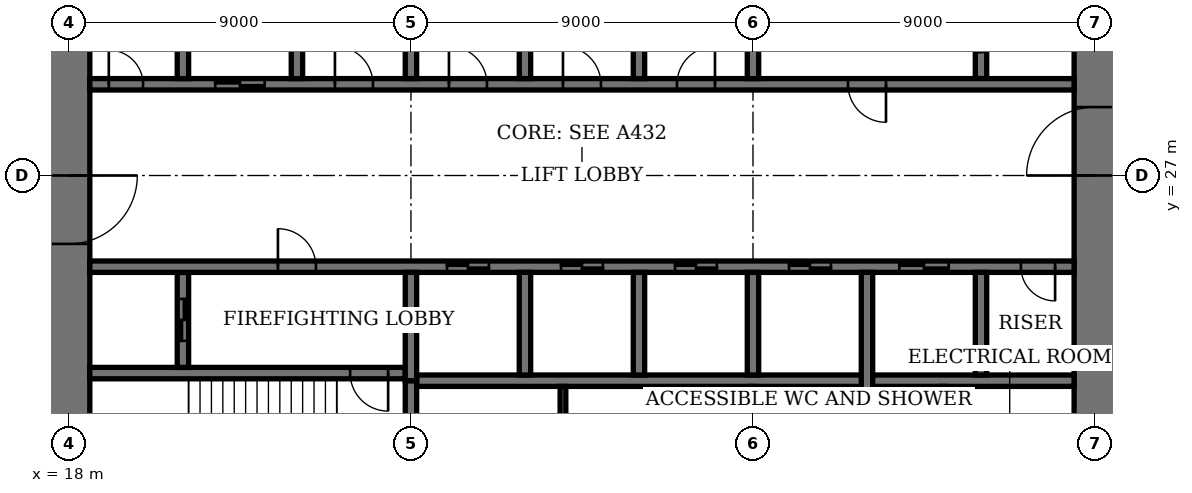
"""IFC4 building model, lengths in metres.
Left out: names, types, materials, properties, quantities, classifications, styles, units other than length and angle.
Written with IfcOpenShell. Run it as: python <this file> out.ifc"""

import sys

from ifc_helpers import new_model, si_unit, direction, frame, frame_2d, origin, place, context, subcontext, project, spatial, rectangle, extrude, element, fill, save


model = new_model("IFC4")
c1 = context("Model", 3, precision=1e-05, world=origin(), true_north=direction((0.0, 1.0)))
c2 = subcontext(c1, "Body", "Model", "MODEL_VIEW")
j1 = project(units=[si_unit("LENGTHUNIT", "METRE"), si_unit("PLANEANGLEUNIT", "RADIAN")], contexts=[c1])
p1 = place(None, origin())
s1 = spatial("IfcSite", under=j1, at=p1, CompositionType="ELEMENT")
p2 = place(p1, origin())
s2 = spatial("IfcBuilding", under=s1, at=p2, CompositionType="ELEMENT")
p3 = place(p2, frame((0.0, 0.0, 243.4)))
s3 = spatial("IfcBuildingStorey", under=s2, at=p3, CompositionType="ELEMENT", Elevation=243.4)
p4 = place(p3, frame((18.0, 35.45, 0.0), z_axis=(0.0, 0.0, 1.0), x_axis=(0.0, -1.0, 0.0)))
e1 = element("IfcWall", 1, at=p4, inside=s3, PredefinedType="SHEAR", context=c2, shape_type="SweptSolid", body=[
    extrude(rectangle(XDim=16.9, YDim=1.1, at=frame_2d((8.45, 0.0))), origin(), (0.0, 0.0, 1.0), 4.0),
])
p5 = place(p4, frame((8.45, 0.0, 0.0)))
e2 = element("IfcOpeningElement", 2, at=p5, cuts=e1, PredefinedType="OPENING", context=c2, shape_type="SweptSolid", body=[
    extrude(rectangle(XDim=1.8, YDim=2.4, at=frame_2d((0.9, 1.2))), frame((0.0, 0.56, 0.0), z_axis=(0.0, -1.0, 0.0), x_axis=(1.0, 0.0, 0.0)), (0.0, 0.0, 1.0), 1.12),
])
p6 = place(p3, frame((45.0, 18.55, 0.0), z_axis=(0.0, 0.0, 1.0), x_axis=(0.0, 1.0, 0.0)))
e3 = element("IfcWall", 3, at=p6, inside=s3, PredefinedType="SHEAR", context=c2, shape_type="SweptSolid", body=[
    extrude(rectangle(XDim=16.9, YDim=1.1, at=frame_2d((8.45, 0.0))), origin(), (0.0, 0.0, 1.0), 4.0),
])
p7 = place(p6, frame((8.45, 0.0, 0.0)))
e4 = element("IfcOpeningElement", 4, at=p7, cuts=e3, PredefinedType="OPENING", context=c2, shape_type="SweptSolid", body=[
    extrude(rectangle(XDim=1.8, YDim=2.4, at=frame_2d((0.9, 1.2))), frame((0.0, 0.56, 0.0), z_axis=(0.0, -1.0, 0.0), x_axis=(1.0, 0.0, 0.0)), (0.0, 0.0, 1.0), 1.12),
])
p8 = place(p3, frame((18.55, 21.8, 0.0), z_axis=(0.0, 0.0, 1.0), x_axis=(1.0, 0.0, 0.0)))
e5 = element("IfcWall", 5, at=p8, inside=s3, PredefinedType="SHEAR", context=c2, shape_type="SweptSolid", body=[
    extrude(rectangle(XDim=8.3, YDim=0.3, at=frame_2d((4.15, 0.0))), origin(), (0.0, 0.0, 1.0), 4.0),
])
p9 = place(p8, frame((6.85, 0.0, 0.0)))
e6 = element("IfcOpeningElement", 6, at=p9, cuts=e5, PredefinedType="OPENING", context=c2, shape_type="SweptSolid", body=[
    extrude(rectangle(XDim=1.0, YDim=2.4, at=frame_2d((0.5, 1.2))), frame((0.0, 0.16, 0.0), z_axis=(0.0, -1.0, 0.0), x_axis=(1.0, 0.0, 0.0)), (0.0, 0.0, 1.0), 0.32),
])
p10 = place(p3, frame((27.0, 18.55, 0.0), z_axis=(0.0, 0.0, 1.0), x_axis=(0.0, 1.0, 0.0)))
e7 = element("IfcWall", 7, at=p10, inside=s3, PredefinedType="SHEAR", context=c2, shape_type="SweptSolid", body=[
    extrude(rectangle(XDim=3.05, YDim=0.3, at=frame_2d((1.525, 0.0))), origin(), (0.0, 0.0, 1.0), 4.0),
])
p11 = place(p3, frame((21.0, 21.95, 0.0), z_axis=(0.0, 0.0, 1.0), x_axis=(0.0, 1.0, 0.0)))
e8 = element("IfcWall", 8, at=p11, inside=s3, PredefinedType="SHEAR", context=c2, shape_type="SweptSolid", body=[
    extrude(rectangle(XDim=2.5, YDim=0.3, at=frame_2d((1.25, 0.0))), origin(), (0.0, 0.0, 1.0), 4.0),
])
p12 = place(p11, frame((0.7, 0.0, 0.0)))
e9 = element("IfcOpeningElement", 9, at=p12, cuts=e8, PredefinedType="OPENING", context=c2, shape_type="SweptSolid", body=[
    extrude(rectangle(XDim=1.1, YDim=2.4, at=frame_2d((0.55, 1.2))), frame((0.0, 0.16, 0.0), z_axis=(0.0, -1.0, 0.0), x_axis=(1.0, 0.0, 0.0)), (0.0, 0.0, 1.0), 0.32),
])
p13 = place(p3, frame((42.0, 29.55, 0.0), z_axis=(0.0, 0.0, 1.0), x_axis=(0.0, 1.0, 0.0)))
e10 = element("IfcWall", 10, at=p13, inside=s3, PredefinedType="SHEAR", context=c2, shape_type="SweptSolid", body=[
    extrude(rectangle(XDim=2.5, YDim=0.3, at=frame_2d((1.25, 0.0))), origin(), (0.0, 0.0, 1.0), 4.0),
])
p14 = place(p13, frame((0.7, 0.0, 0.0)))
e11 = element("IfcOpeningElement", 11, at=p14, cuts=e10, PredefinedType="OPENING", context=c2, shape_type="SweptSolid", body=[
    extrude(rectangle(XDim=1.1, YDim=2.4, at=frame_2d((0.55, 1.2))), frame((0.0, 0.16, 0.0), z_axis=(0.0, -1.0, 0.0), x_axis=(1.0, 0.0, 0.0)), (0.0, 0.0, 1.0), 0.32),
])
p15 = place(p3, frame((18.55, 24.6, 0.0), z_axis=(0.0, 0.0, 1.0), x_axis=(1.0, 0.0, 0.0)))
e12 = element("IfcWall", 12, at=p15, inside=s3, PredefinedType="SHEAR", context=c2, shape_type="SweptSolid", body=[
    extrude(rectangle(XDim=25.9, YDim=0.3, at=frame_2d((12.95, 0.0))), origin(), (0.0, 0.0, 1.0), 4.0),
])
p16 = place(p15, frame((4.95, 0.0, 0.0)))
e13 = element("IfcOpeningElement", 13, at=p16, cuts=e12, PredefinedType="OPENING", context=c2, shape_type="SweptSolid", body=[
    extrude(rectangle(XDim=1.0, YDim=2.4, at=frame_2d((0.5, 1.2))), frame((0.0, 0.16, 0.0), z_axis=(0.0, -1.0, 0.0), x_axis=(1.0, 0.0, 0.0)), (0.0, 0.0, 1.0), 0.32),
])
p17 = place(p15, frame((24.5, 0.0, 0.0)))
e14 = element("IfcOpeningElement", 14, at=p17, cuts=e12, PredefinedType="OPENING", context=c2, shape_type="SweptSolid", body=[
    extrude(rectangle(XDim=0.9, YDim=2.1, at=frame_2d((0.45, 1.05))), frame((0.0, 0.16, 0.0), z_axis=(0.0, -1.0, 0.0), x_axis=(1.0, 0.0, 0.0)), (0.0, 0.0, 1.0), 0.32),
])
p18 = place(p15, frame((9.4, 0.0, 0.0)))
e15 = element("IfcOpeningElement", 15, at=p18, cuts=e12, PredefinedType="OPENING", context=c2, shape_type="SweptSolid", body=[
    extrude(rectangle(XDim=1.1, YDim=2.4, at=frame_2d((0.55, 1.2))), frame((0.0, 0.16, 0.0), z_axis=(0.0, -1.0, 0.0), x_axis=(1.0, 0.0, 0.0)), (0.0, 0.0, 1.0), 0.32),
])
p19 = place(p15, frame((12.4, 0.0, 0.0)))
e16 = element("IfcOpeningElement", 16, at=p19, cuts=e12, PredefinedType="OPENING", context=c2, shape_type="SweptSolid", body=[
    extrude(rectangle(XDim=1.1, YDim=2.4, at=frame_2d((0.55, 1.2))), frame((0.0, 0.16, 0.0), z_axis=(0.0, -1.0, 0.0), x_axis=(1.0, 0.0, 0.0)), (0.0, 0.0, 1.0), 0.32),
])
p20 = place(p15, frame((15.4, 0.0, 0.0)))
e17 = element("IfcOpeningElement", 17, at=p20, cuts=e12, PredefinedType="OPENING", context=c2, shape_type="SweptSolid", body=[
    extrude(rectangle(XDim=1.1, YDim=2.4, at=frame_2d((0.55, 1.2))), frame((0.0, 0.16, 0.0), z_axis=(0.0, -1.0, 0.0), x_axis=(1.0, 0.0, 0.0)), (0.0, 0.0, 1.0), 0.32),
])
p21 = place(p15, frame((18.4, 0.0, 0.0)))
e18 = element("IfcOpeningElement", 18, at=p21, cuts=e12, PredefinedType="OPENING", context=c2, shape_type="SweptSolid", body=[
    extrude(rectangle(XDim=1.1, YDim=2.4, at=frame_2d((0.55, 1.2))), frame((0.0, 0.16, 0.0), z_axis=(0.0, -1.0, 0.0), x_axis=(1.0, 0.0, 0.0)), (0.0, 0.0, 1.0), 0.32),
])
p22 = place(p15, frame((21.3, 0.0, 0.0)))
e19 = element("IfcOpeningElement", 19, at=p22, cuts=e12, PredefinedType="OPENING", context=c2, shape_type="SweptSolid", body=[
    extrude(rectangle(XDim=1.3, YDim=2.4, at=frame_2d((0.65, 1.2))), frame((0.0, 0.16, 0.0), z_axis=(0.0, -1.0, 0.0), x_axis=(1.0, 0.0, 0.0)), (0.0, 0.0, 1.0), 0.32),
])
p23 = place(p3, frame((18.55, 29.4, 0.0), z_axis=(0.0, 0.0, 1.0), x_axis=(1.0, 0.0, 0.0)))
e20 = element("IfcWall", 20, at=p23, inside=s3, PredefinedType="SHEAR", context=c2, shape_type="SweptSolid", body=[
    extrude(rectangle(XDim=25.9, YDim=0.3, at=frame_2d((12.95, 0.0))), origin(), (0.0, 0.0, 1.0), 4.0),
])
p24 = place(p23, frame((19.95, 0.0, 0.0)))
e21 = element("IfcOpeningElement", 21, at=p24, cuts=e20, PredefinedType="OPENING", context=c2, shape_type="SweptSolid", body=[
    extrude(rectangle(XDim=1.0, YDim=2.4, at=frame_2d((0.5, 1.2))), frame((0.0, 0.16, 0.0), z_axis=(0.0, -1.0, 0.0), x_axis=(1.0, 0.0, 0.0)), (0.0, 0.0, 1.0), 0.32),
])
p25 = place(p23, frame((0.5, 0.0, 0.0)))
e22 = element("IfcOpeningElement", 22, at=p25, cuts=e20, PredefinedType="OPENING", context=c2, shape_type="SweptSolid", body=[
    extrude(rectangle(XDim=0.9, YDim=2.1, at=frame_2d((0.45, 1.05))), frame((0.0, 0.16, 0.0), z_axis=(0.0, -1.0, 0.0), x_axis=(1.0, 0.0, 0.0)), (0.0, 0.0, 1.0), 0.32),
])
p26 = place(p23, frame((15.45, 0.0, 0.0)))
e23 = element("IfcOpeningElement", 23, at=p26, cuts=e20, PredefinedType="OPENING", context=c2, shape_type="SweptSolid", body=[
    extrude(rectangle(XDim=1.0, YDim=2.4, at=frame_2d((0.5, 1.2))), frame((0.0, 0.16, 0.0), z_axis=(0.0, -1.0, 0.0), x_axis=(1.0, 0.0, 0.0)), (0.0, 0.0, 1.0), 0.32),
])
p27 = place(p23, frame((12.45, 0.0, 0.0)))
e24 = element("IfcOpeningElement", 24, at=p27, cuts=e20, PredefinedType="OPENING", context=c2, shape_type="SweptSolid", body=[
    extrude(rectangle(XDim=1.0, YDim=2.4, at=frame_2d((0.5, 1.2))), frame((0.0, 0.16, 0.0), z_axis=(0.0, -1.0, 0.0), x_axis=(1.0, 0.0, 0.0)), (0.0, 0.0, 1.0), 0.32),
])
p28 = place(p23, frame((9.45, 0.0, 0.0)))
e25 = element("IfcOpeningElement", 25, at=p28, cuts=e20, PredefinedType="OPENING", context=c2, shape_type="SweptSolid", body=[
    extrude(rectangle(XDim=1.0, YDim=2.4, at=frame_2d((0.5, 1.2))), frame((0.0, 0.16, 0.0), z_axis=(0.0, -1.0, 0.0), x_axis=(1.0, 0.0, 0.0)), (0.0, 0.0, 1.0), 0.32),
])
p29 = place(p23, frame((6.45, 0.0, 0.0)))
e26 = element("IfcOpeningElement", 26, at=p29, cuts=e20, PredefinedType="OPENING", context=c2, shape_type="SweptSolid", body=[
    extrude(rectangle(XDim=1.0, YDim=2.4, at=frame_2d((0.5, 1.2))), frame((0.0, 0.16, 0.0), z_axis=(0.0, -1.0, 0.0), x_axis=(1.0, 0.0, 0.0)), (0.0, 0.0, 1.0), 0.32),
])
p30 = place(p23, frame((3.3, 0.0, 0.0)))
e27 = element("IfcOpeningElement", 27, at=p30, cuts=e20, PredefinedType="OPENING", context=c2, shape_type="SweptSolid", body=[
    extrude(rectangle(XDim=1.3, YDim=2.4, at=frame_2d((0.65, 1.2))), frame((0.0, 0.16, 0.0), z_axis=(0.0, -1.0, 0.0), x_axis=(1.0, 0.0, 0.0)), (0.0, 0.0, 1.0), 0.32),
])
p31 = place(p3, frame((27.15, 21.6, 0.0), z_axis=(0.0, 0.0, 1.0), x_axis=(1.0, 0.0, 0.0)))
e28 = element("IfcWall", 28, at=p31, inside=s3, PredefinedType="SHEAR", context=c2, shape_type="SweptSolid", body=[
    extrude(rectangle(XDim=17.3, YDim=0.3, at=frame_2d((8.65, 0.0))), origin(), (0.0, 0.0, 1.0), 4.0),
])
for number, where, z_axis, x_axis in (
    (29, (30.0, 21.75, 0.0), (0.0, 0.0, 1.0), (0.0, 1.0, 0.0)),
    (30, (33.0, 29.55, 0.0), (0.0, 0.0, 1.0), (0.0, 1.0, 0.0)),
    (31, (33.0, 21.75, 0.0), (0.0, 0.0, 1.0), (0.0, 1.0, 0.0)),
    (32, (30.0, 29.55, 0.0), (0.0, 0.0, 1.0), (0.0, 1.0, 0.0)),
    (33, (36.0, 21.75, 0.0), (0.0, 0.0, 1.0), (0.0, 1.0, 0.0)),
    (34, (27.0, 29.55, 0.0), (0.0, 0.0, 1.0), (0.0, 1.0, 0.0)),
):
    element("IfcWall", number, at=place(p3, frame(where, z_axis=z_axis, x_axis=x_axis)), inside=s3, PredefinedType="SHEAR", context=c2, shape_type="SweptSolid", body=[
        extrude(rectangle(XDim=2.7, YDim=0.3, at=frame_2d((1.35, 0.0))), origin(), (0.0, 0.0, 1.0), 4.0),
    ])
for number, where, z_axis, x_axis in (
    (35, (39.0, 18.55, 0.0), (0.0, 0.0, 1.0), (0.0, 1.0, 0.0)),
    (36, (24.0, 29.55, 0.0), (0.0, 0.0, 1.0), (0.0, 1.0, 0.0)),
):
    element("IfcWall", number, at=place(p3, frame(where, z_axis=z_axis, x_axis=x_axis)), inside=s3, PredefinedType="SHEAR", context=c2, shape_type="SweptSolid", body=[
        extrude(rectangle(XDim=5.9, YDim=0.3, at=frame_2d((2.95, 0.0))), origin(), (0.0, 0.0, 1.0), 4.0),
    ])
for number, where, z_axis, x_axis in (
    (37, (42.0, 21.75, 0.0), (0.0, 0.0, 1.0), (0.0, 1.0, 0.0)),
    (38, (21.0, 29.55, 0.0), (0.0, 0.0, 1.0), (0.0, 1.0, 0.0)),
):
    element("IfcWall", number, at=place(p3, frame(where, z_axis=z_axis, x_axis=x_axis)), inside=s3, PredefinedType="SHEAR", context=c2, shape_type="SweptSolid", body=[
        extrude(rectangle(XDim=2.7, YDim=0.3, at=frame_2d((1.35, 0.0))), origin(), (0.0, 0.0, 1.0), 4.0),
    ])
for number, where, z_axis, x_axis in (
    (39, (27.0, 21.6, 0.0), (0.0, 0.0, 1.0), (0.0, 1.0, 0.0)),
    (40, (36.0, 29.55, 0.0), (0.0, 0.0, 1.0), (0.0, 1.0, 0.0)),
):
    element("IfcWall", number, at=place(p3, frame(where, z_axis=z_axis, x_axis=x_axis)), inside=s3, PredefinedType="SHEAR", context=c2, shape_type="SweptSolid", body=[
        extrude(rectangle(XDim=2.85, YDim=0.3, at=frame_2d((1.425, 0.0))), origin(), (0.0, 0.0, 1.0), 4.0),
    ])
for number, where, z_axis, x_axis in (
    (41, (31.0, 18.55, 0.0), (0.0, 0.0, 1.0), (0.0, 1.0, 0.0)),
    (42, (36.0, 18.55, 0.0), (0.0, 0.0, 1.0), (0.0, 1.0, 0.0)),
):
    element("IfcWall", number, at=place(p3, frame(where, z_axis=z_axis, x_axis=x_axis)), inside=s3, PredefinedType="PARTITIONING", context=c2, shape_type="SweptSolid", body=[
        extrude(rectangle(XDim=2.9, YDim=0.15, at=frame_2d((1.45, 0.0))), origin(), (0.0, 0.0, 1.0), 3.75),
    ])
p32 = place(p3, frame((41.0, 18.55, 0.0), z_axis=(0.0, 0.0, 1.0), x_axis=(0.0, 1.0, 0.0)))
e43 = element("IfcWall", 43, at=p32, inside=s3, PredefinedType="PARTITIONING", context=c2, shape_type="SweptSolid", body=[
    extrude(rectangle(XDim=2.9, YDim=0.12, at=frame_2d((1.45, 0.0))), origin(), (0.0, 0.0, 1.0), 3.75),
])
p33 = place(p32, frame((0.95, 0.0, 0.0)))
e44 = element("IfcOpeningElement", 44, at=p33, cuts=e43, PredefinedType="OPENING", context=c2, shape_type="SweptSolid", body=[
    extrude(rectangle(XDim=1.0, YDim=2.4, at=frame_2d((0.5, 1.2))), frame((0.0, 0.07, 0.0), z_axis=(0.0, -1.0, 0.0), x_axis=(1.0, 0.0, 0.0)), (0.0, 0.0, 1.0), 0.14),
])
p34 = place(p5, origin())
e45 = element("IfcDoor", 45, at=p34, inside=s3, OperationType="DOUBLE_DOOR_DOUBLE_SWING", PredefinedType="DOOR", context=c2, shape_type="SweptSolid", body=[
    extrude(rectangle(XDim=1.8, YDim=2.4, at=frame_2d((0.9, 1.2))), frame((0.0, 0.03, 0.0), z_axis=(0.0, -1.0, 0.0), x_axis=(1.0, 0.0, 0.0)), (0.0, 0.0, 1.0), 0.06),
    extrude(rectangle(XDim=0.04, YDim=2.4, at=frame_2d((0.02, 1.2))), frame((0.0, 0.55, 0.0), z_axis=(0.0, -1.0, 0.0), x_axis=(1.0, 0.0, 0.0)), (0.0, 0.0, 1.0), 1.1),
    extrude(rectangle(XDim=0.04, YDim=2.4, at=frame_2d((1.78, 1.2))), frame((0.0, 0.55, 0.0), z_axis=(0.0, -1.0, 0.0), x_axis=(1.0, 0.0, 0.0)), (0.0, 0.0, 1.0), 1.1),
    extrude(rectangle(XDim=1.8, YDim=0.04, at=frame_2d((0.9, 2.38))), frame((0.0, 0.55, 0.0), z_axis=(0.0, -1.0, 0.0), x_axis=(1.0, 0.0, 0.0)), (0.0, 0.0, 1.0), 1.1),
])
fill(e2, e45)
p35 = place(p7, origin())
e46 = element("IfcDoor", 46, at=p35, inside=s3, OperationType="DOUBLE_DOOR_DOUBLE_SWING", PredefinedType="DOOR", context=c2, shape_type="SweptSolid", body=[
    extrude(rectangle(XDim=1.8, YDim=2.4, at=frame_2d((0.9, 1.2))), frame((0.0, 0.03, 0.0), z_axis=(0.0, -1.0, 0.0), x_axis=(1.0, 0.0, 0.0)), (0.0, 0.0, 1.0), 0.06),
    extrude(rectangle(XDim=0.04, YDim=2.4, at=frame_2d((0.02, 1.2))), frame((0.0, 0.55, 0.0), z_axis=(0.0, -1.0, 0.0), x_axis=(1.0, 0.0, 0.0)), (0.0, 0.0, 1.0), 1.1),
    extrude(rectangle(XDim=0.04, YDim=2.4, at=frame_2d((1.78, 1.2))), frame((0.0, 0.55, 0.0), z_axis=(0.0, -1.0, 0.0), x_axis=(1.0, 0.0, 0.0)), (0.0, 0.0, 1.0), 1.1),
    extrude(rectangle(XDim=1.8, YDim=0.04, at=frame_2d((0.9, 2.38))), frame((0.0, 0.55, 0.0), z_axis=(0.0, -1.0, 0.0), x_axis=(1.0, 0.0, 0.0)), (0.0, 0.0, 1.0), 1.1),
])
fill(e4, e46)
p36 = place(p9, origin())
e47 = element("IfcDoor", 47, at=p36, inside=s3, OperationType="SINGLE_SWING_RIGHT", PredefinedType="DOOR", context=c2, shape_type="SweptSolid", body=[
    extrude(rectangle(XDim=1.0, YDim=2.4, at=frame_2d((0.5, 1.2))), frame((0.0, 0.03, 0.0), z_axis=(0.0, -1.0, 0.0), x_axis=(1.0, 0.0, 0.0)), (0.0, 0.0, 1.0), 0.06),
])
fill(e6, e47)
p37 = place(p16, origin())
e48 = element("IfcDoor", 48, at=p37, inside=s3, OperationType="SINGLE_SWING_RIGHT", PredefinedType="DOOR", context=c2, shape_type="SweptSolid", body=[
    extrude(rectangle(XDim=1.0, YDim=2.4, at=frame_2d((0.5, 1.2))), frame((0.0, 0.03, 0.0), z_axis=(0.0, -1.0, 0.0), x_axis=(1.0, 0.0, 0.0)), (0.0, 0.0, 1.0), 0.06),
])
fill(e13, e48)
p38 = place(p24, origin())
e49 = element("IfcDoor", 49, at=p38, inside=s3, OperationType="SINGLE_SWING_RIGHT", PredefinedType="DOOR", context=c2, shape_type="SweptSolid", body=[
    extrude(rectangle(XDim=1.0, YDim=2.4, at=frame_2d((0.5, 1.2))), frame((0.0, 0.03, 0.0), z_axis=(0.0, -1.0, 0.0), x_axis=(1.0, 0.0, 0.0)), (0.0, 0.0, 1.0), 0.06),
])
fill(e21, e49)
p39 = place(p17, origin())
e50 = element("IfcDoor", 50, at=p39, inside=s3, OperationType="SINGLE_SWING_RIGHT", PredefinedType="DOOR", context=c2, shape_type="SweptSolid", body=[
    extrude(rectangle(XDim=0.9, YDim=2.1, at=frame_2d((0.45, 1.05))), frame((0.0, 0.03, 0.0), z_axis=(0.0, -1.0, 0.0), x_axis=(1.0, 0.0, 0.0)), (0.0, 0.0, 1.0), 0.06),
])
fill(e14, e50)
p40 = place(p25, origin())
e51 = element("IfcDoor", 51, at=p40, inside=s3, OperationType="SINGLE_SWING_RIGHT", PredefinedType="DOOR", context=c2, shape_type="SweptSolid", body=[
    extrude(rectangle(XDim=0.9, YDim=2.1, at=frame_2d((0.45, 1.05))), frame((0.0, 0.03, 0.0), z_axis=(0.0, -1.0, 0.0), x_axis=(1.0, 0.0, 0.0)), (0.0, 0.0, 1.0), 0.06),
])
fill(e22, e51)
p41 = place(p18, origin())
e52 = element("IfcDoor", 52, at=p41, inside=s3, OperationType="DOUBLE_DOOR_SLIDING", PredefinedType="DOOR", context=c2, shape_type="SweptSolid", body=[
    extrude(rectangle(XDim=1.1, YDim=2.4, at=frame_2d((0.55, 1.2))), frame((0.0, 0.02, 0.0), z_axis=(0.0, -1.0, 0.0), x_axis=(1.0, 0.0, 0.0)), (0.0, 0.0, 1.0), 0.04),
])
fill(e15, e52)
p42 = place(p19, origin())
e53 = element("IfcDoor", 53, at=p42, inside=s3, OperationType="DOUBLE_DOOR_SLIDING", PredefinedType="DOOR", context=c2, shape_type="SweptSolid", body=[
    extrude(rectangle(XDim=1.1, YDim=2.4, at=frame_2d((0.55, 1.2))), frame((0.0, 0.02, 0.0), z_axis=(0.0, -1.0, 0.0), x_axis=(1.0, 0.0, 0.0)), (0.0, 0.0, 1.0), 0.04),
])
fill(e16, e53)
p43 = place(p20, origin())
e54 = element("IfcDoor", 54, at=p43, inside=s3, OperationType="DOUBLE_DOOR_SLIDING", PredefinedType="DOOR", context=c2, shape_type="SweptSolid", body=[
    extrude(rectangle(XDim=1.1, YDim=2.4, at=frame_2d((0.55, 1.2))), frame((0.0, 0.02, 0.0), z_axis=(0.0, -1.0, 0.0), x_axis=(1.0, 0.0, 0.0)), (0.0, 0.0, 1.0), 0.04),
])
fill(e17, e54)
p44 = place(p21, origin())
e55 = element("IfcDoor", 55, at=p44, inside=s3, OperationType="DOUBLE_DOOR_SLIDING", PredefinedType="DOOR", context=c2, shape_type="SweptSolid", body=[
    extrude(rectangle(XDim=1.1, YDim=2.4, at=frame_2d((0.55, 1.2))), frame((0.0, 0.02, 0.0), z_axis=(0.0, -1.0, 0.0), x_axis=(1.0, 0.0, 0.0)), (0.0, 0.0, 1.0), 0.04),
])
fill(e18, e55)
p45 = place(p26, origin())
e56 = element("IfcDoor", 56, at=p45, inside=s3, OperationType="SINGLE_SWING_LEFT", PredefinedType="DOOR", context=c2, shape_type="SweptSolid", body=[
    extrude(rectangle(XDim=1.0, YDim=2.4, at=frame_2d((0.5, 1.2))), frame((0.0, 0.03, 0.0), z_axis=(0.0, -1.0, 0.0), x_axis=(1.0, 0.0, 0.0)), (0.0, 0.0, 1.0), 0.06),
])
fill(e23, e56)
p46 = place(p27, origin())
e57 = element("IfcDoor", 57, at=p46, inside=s3, OperationType="SINGLE_SWING_RIGHT", PredefinedType="DOOR", context=c2, shape_type="SweptSolid", body=[
    extrude(rectangle(XDim=1.0, YDim=2.4, at=frame_2d((0.5, 1.2))), frame((0.0, 0.03, 0.0), z_axis=(0.0, -1.0, 0.0), x_axis=(1.0, 0.0, 0.0)), (0.0, 0.0, 1.0), 0.06),
])
fill(e24, e57)
p47 = place(p28, origin())
e58 = element("IfcDoor", 58, at=p47, inside=s3, OperationType="SINGLE_SWING_RIGHT", PredefinedType="DOOR", context=c2, shape_type="SweptSolid", body=[
    extrude(rectangle(XDim=1.0, YDim=2.4, at=frame_2d((0.5, 1.2))), frame((0.0, 0.03, 0.0), z_axis=(0.0, -1.0, 0.0), x_axis=(1.0, 0.0, 0.0)), (0.0, 0.0, 1.0), 0.06),
])
fill(e25, e58)
p48 = place(p29, origin())
e59 = element("IfcDoor", 59, at=p48, inside=s3, OperationType="SINGLE_SWING_RIGHT", PredefinedType="DOOR", context=c2, shape_type="SweptSolid", body=[
    extrude(rectangle(XDim=1.0, YDim=2.4, at=frame_2d((0.5, 1.2))), frame((0.0, 0.03, 0.0), z_axis=(0.0, -1.0, 0.0), x_axis=(1.0, 0.0, 0.0)), (0.0, 0.0, 1.0), 0.06),
])
fill(e26, e59)
p49 = place(p22, origin())
e60 = element("IfcDoor", 60, at=p49, inside=s3, OperationType="DOUBLE_DOOR_SLIDING", PredefinedType="DOOR", context=c2, shape_type="SweptSolid", body=[
    extrude(rectangle(XDim=1.3, YDim=2.4, at=frame_2d((0.65, 1.2))), frame((0.0, 0.02, 0.0), z_axis=(0.0, -1.0, 0.0), x_axis=(1.0, 0.0, 0.0)), (0.0, 0.0, 1.0), 0.04),
])
fill(e19, e60)
p50 = place(p30, origin())
e61 = element("IfcDoor", 61, at=p50, inside=s3, OperationType="DOUBLE_DOOR_SLIDING", PredefinedType="DOOR", context=c2, shape_type="SweptSolid", body=[
    extrude(rectangle(XDim=1.3, YDim=2.4, at=frame_2d((0.65, 1.2))), frame((0.0, 0.02, 0.0), z_axis=(0.0, -1.0, 0.0), x_axis=(1.0, 0.0, 0.0)), (0.0, 0.0, 1.0), 0.04),
])
fill(e27, e61)
p51 = place(p12, origin())
e62 = element("IfcDoor", 62, at=p51, inside=s3, OperationType="DOUBLE_DOOR_SLIDING", PredefinedType="DOOR", context=c2, shape_type="SweptSolid", body=[
    extrude(rectangle(XDim=1.1, YDim=2.4, at=frame_2d((0.55, 1.2))), frame((0.0, 0.03, 0.0), z_axis=(0.0, -1.0, 0.0), x_axis=(1.0, 0.0, 0.0)), (0.0, 0.0, 1.0), 0.06),
])
fill(e9, e62)
save(model, sys.argv[1])
